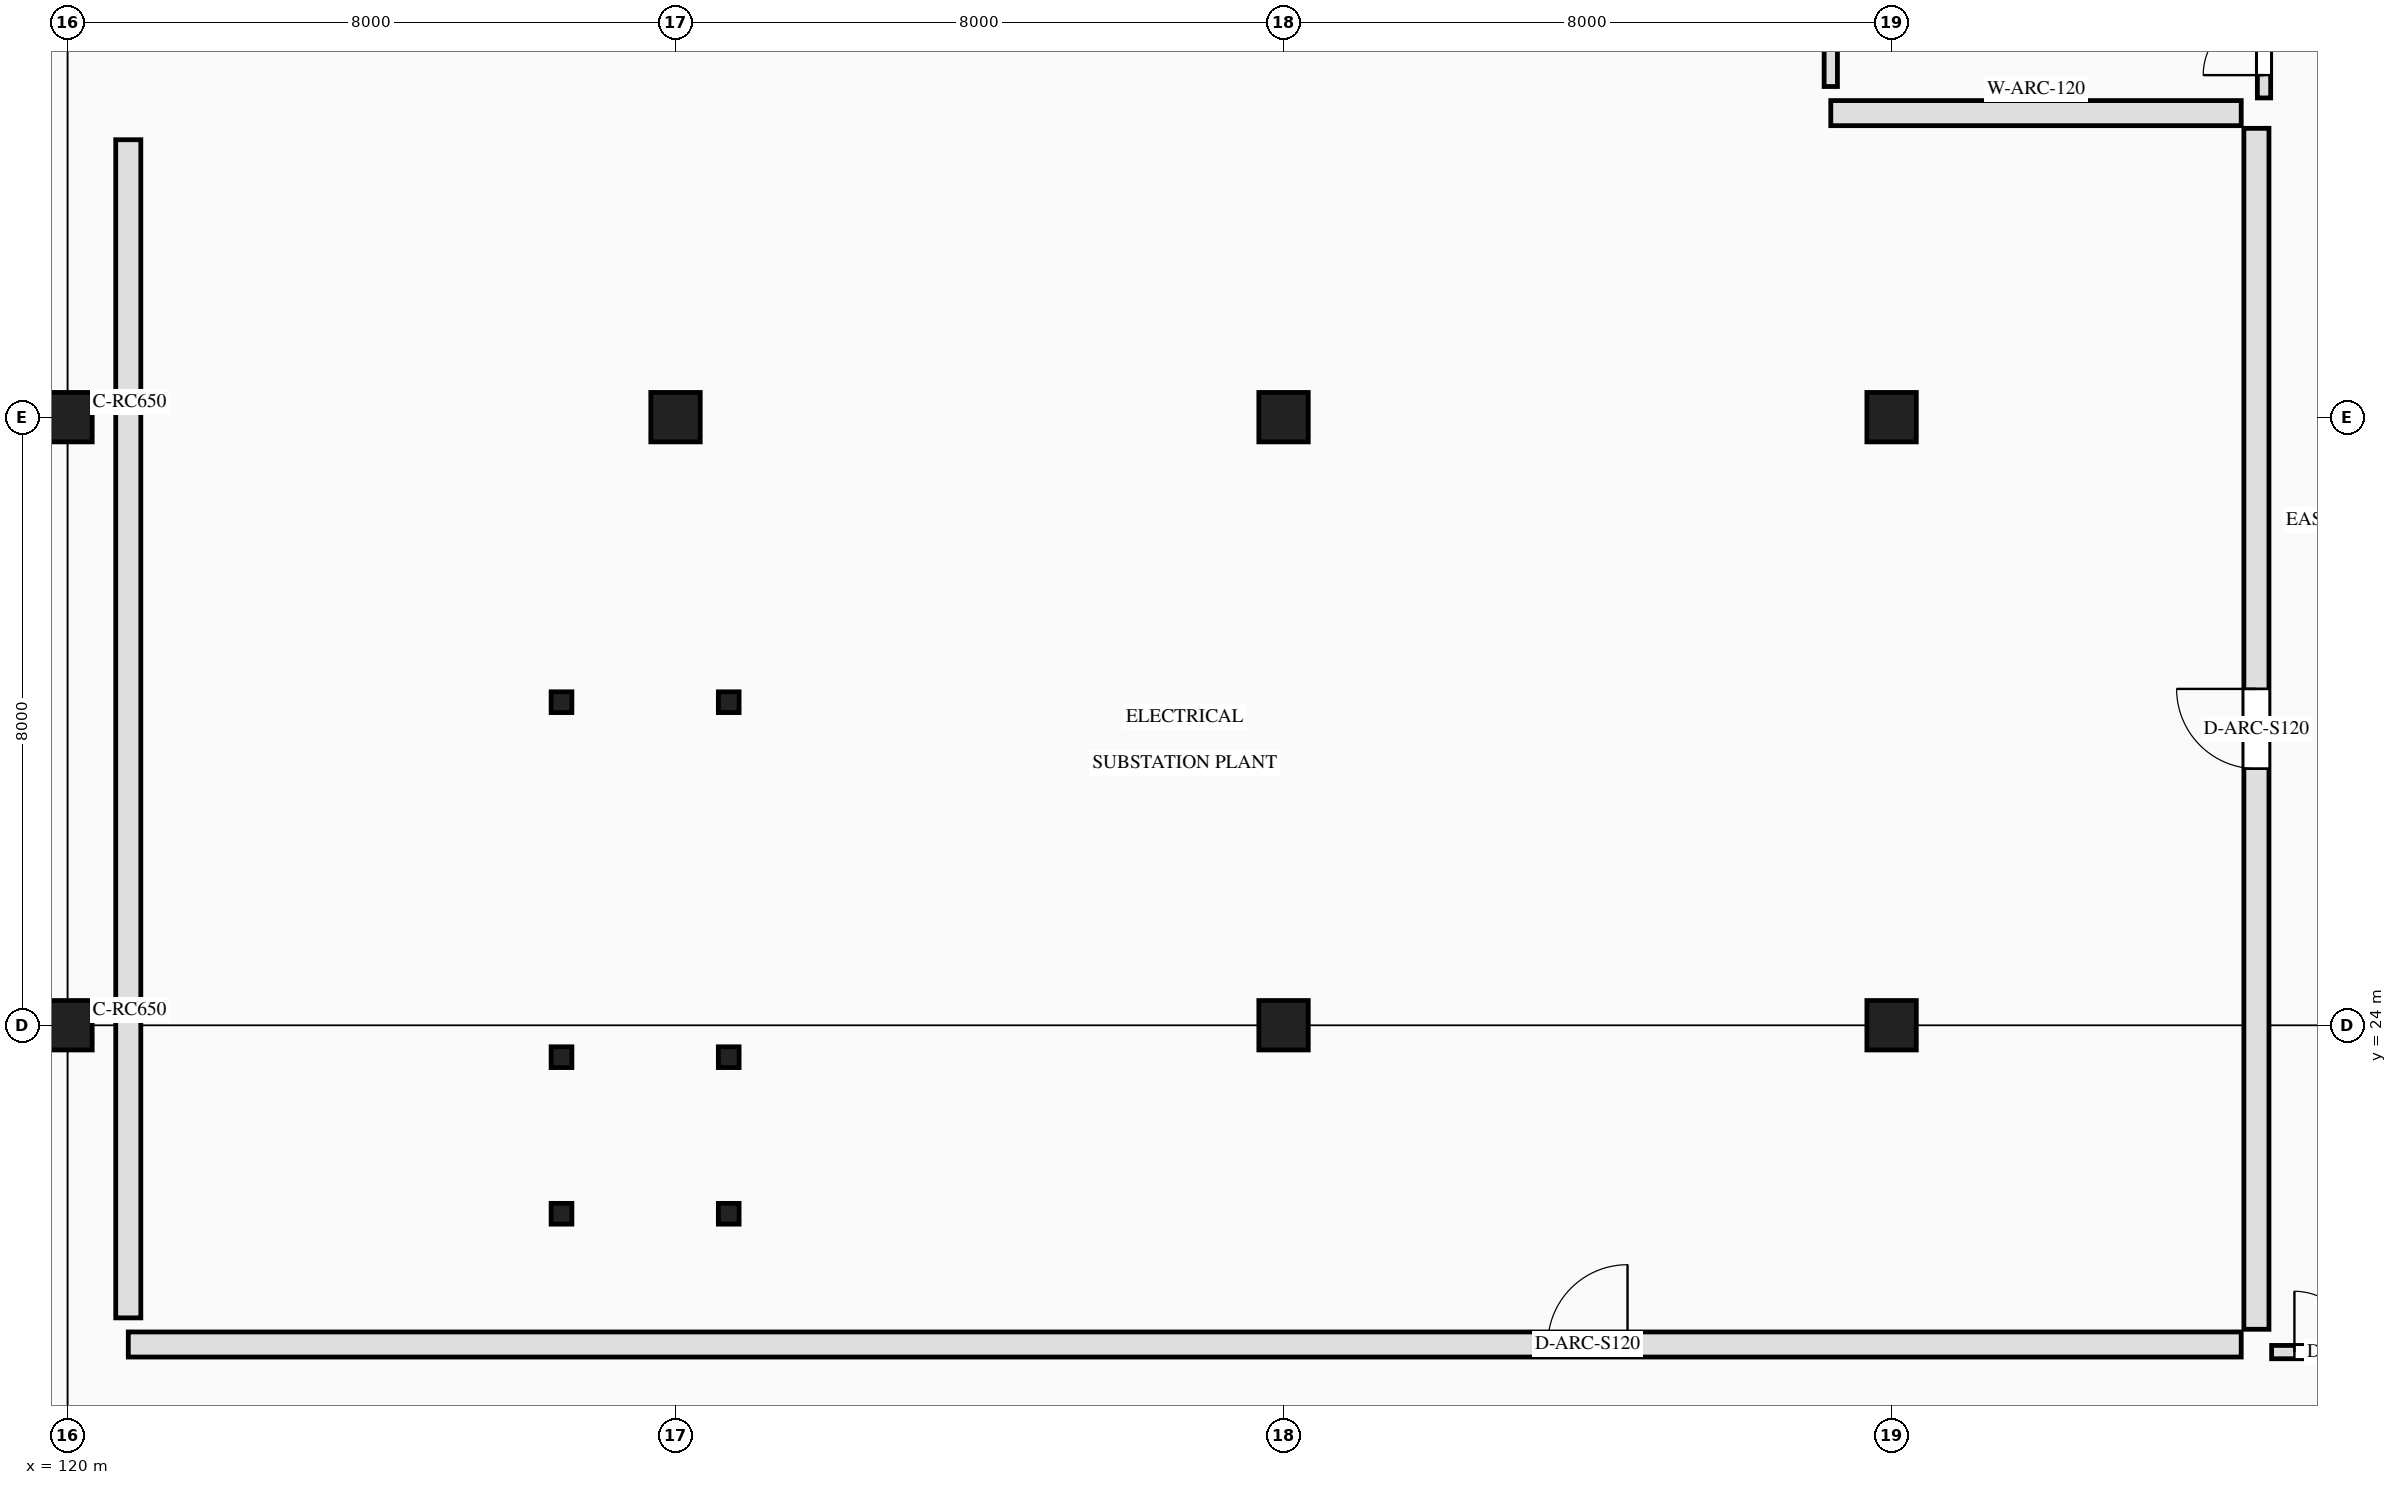
"""IFC4 building model, lengths in metres.
Left out: names, types, materials, properties, quantities, classifications, styles, units other than length and angle.
Written with IfcOpenShell. Run it as: python <this file> out.ifc"""

import sys

from ifc_helpers import new_model, si_unit, direction, frame, frame_2d, origin, origin_2d, place, context, subcontext, project, spatial, rectangle, hollow_circle, extrude, element, fill, save


model = new_model("IFC4")
c1 = context("Model", 3, precision=1e-05, world=origin(), true_north=direction((0.0, 1.0)))
c2 = subcontext(c1, "Body", "Model", "MODEL_VIEW")
j1 = project(units=[si_unit("LENGTHUNIT", "METRE"), si_unit("PLANEANGLEUNIT", "RADIAN")], contexts=[c1])
p1 = place(None, origin())
s1 = spatial("IfcSite", under=j1, at=p1, CompositionType="ELEMENT")
p2 = place(p1, origin())
s2 = spatial("IfcBuilding", under=s1, at=p2, CompositionType="ELEMENT")
p3 = place(p2, frame((0.0, 0.0, -5.4)))
s3 = spatial("IfcBuildingStorey", under=s2, at=p3, CompositionType="ELEMENT", Elevation=-5.4)
for number, where, z_axis, x_axis in (
    (1, (120.0, 24.0, -0.4), (0.0, 0.0, 1.0), (1.0, 0.0, 0.0)),
    (2, (120.0, 32.0, -0.4), (0.0, 0.0, 1.0), (1.0, 0.0, 0.0)),
    (3, (128.0, 32.0, -0.4), (0.0, 0.0, 1.0), (1.0, 0.0, 0.0)),
    (4, (136.0, 24.0, -0.4), (0.0, 0.0, 1.0), (1.0, 0.0, 0.0)),
    (5, (136.0, 32.0, -0.4), (0.0, 0.0, 1.0), (1.0, 0.0, 0.0)),
    (6, (144.0, 24.0, -0.4), (0.0, 0.0, 1.0), (1.0, 0.0, 0.0)),
    (7, (144.0, 32.0, -0.4), (0.0, 0.0, 1.0), (1.0, 0.0, 0.0)),
):
    element("IfcColumn", number, at=place(p3, frame(where, z_axis=z_axis, x_axis=x_axis)), inside=s3, PredefinedType="COLUMN", context=c2, shape_type="SweptSolid", body=[
        extrude(rectangle(XDim=0.65, YDim=0.65, at=origin_2d()), origin(), (0.0, 0.0, 1.0), 5.8),
    ])
for number, where, z_axis, x_axis in (
    (8, (128.7, 21.52, 0.0), (0.0, 0.0, 1.0), (1.0, 0.0, 0.0)),
    (9, (126.5, 21.52, 0.0), (0.0, 0.0, 1.0), (1.0, 0.0, 0.0)),
    (10, (128.7, 23.58, 0.0), (0.0, 0.0, 1.0), (1.0, 0.0, 0.0)),
    (11, (126.5, 23.58, 0.0), (0.0, 0.0, 1.0), (1.0, 0.0, 0.0)),
    (12, (128.7, 28.25, 0.0), (0.0, 0.0, 1.0), (1.0, 0.0, 0.0)),
    (13, (126.5, 28.25, 0.0), (0.0, 0.0, 1.0), (1.0, 0.0, 0.0)),
):
    element("IfcColumn", number, at=place(p3, frame(where, z_axis=z_axis, x_axis=x_axis)), inside=s3, PredefinedType="COLUMN", context=c2, shape_type="SweptSolid", body=[
        extrude(hollow_circle(Radius=0.136, WallThickness=0.012, at=origin_2d()), origin(), (0.0, 0.0, 1.0), 5.4),
    ])
p4 = place(p3, frame((148.9, 36.2, 0.0), z_axis=(0.0, 0.0, 1.0), x_axis=(0.0, 1.0, 0.0)))
e14 = element("IfcWall", 14, at=p4, inside=s3, PredefinedType="PARTITIONING", context=c2, shape_type="SweptSolid", body=[
    extrude(rectangle(XDim=4.6, YDim=0.175, at=frame_2d((2.3, 0.0))), origin(), (0.0, 0.0, 1.0), 5.12),
])
p5 = place(p4, frame((0.3, 0.0, 0.0)))
e15 = element("IfcOpeningElement", 15, at=p5, cuts=e14, PredefinedType="OPENING", context=c2, shape_type="SweptSolid", body=[
    extrude(rectangle(XDim=1.6, YDim=2.25, at=frame_2d((0.8, 1.125))), frame((0.0, 0.097, 0.0), z_axis=(0.0, -1.0, 0.0), x_axis=(1.0, 0.0, 0.0)), (0.0, 0.0, 1.0), 0.195),
])
p6 = place(p3, frame((143.2, 36.0, 0.0), z_axis=(0.0, 0.0, 1.0), x_axis=(1.0, 0.0, 0.0)))
e16 = element("IfcWall", 16, at=p6, inside=s3, PredefinedType="SOLIDWALL", context=c2, shape_type="SweptSolid", body=[
    extrude(rectangle(XDim=5.4, YDim=0.33, at=frame_2d((2.7, 0.0))), origin(), (0.0, 0.0, 1.0), 5.12),
])
p7 = place(p3, frame((149.0, 19.7, 0.0), z_axis=(0.0, 0.0, 1.0), x_axis=(1.0, 0.0, 0.0)))
e17 = element("IfcWall", 17, at=p7, inside=s3, PredefinedType="PARTITIONING", context=c2, shape_type="SweptSolid", body=[
    extrude(rectangle(XDim=3.2, YDim=0.175, at=frame_2d((1.6, 0.0))), origin(), (0.0, 0.0, 1.0), 5.12),
])
p8 = place(p7, frame((0.3, 0.0, 0.0)))
e18 = element("IfcOpeningElement", 18, at=p8, cuts=e17, PredefinedType="OPENING", context=c2, shape_type="SweptSolid", body=[
    extrude(rectangle(XDim=1.6, YDim=2.25, at=frame_2d((0.8, 1.125))), frame((0.0, 0.097, 0.0), z_axis=(0.0, -1.0, 0.0), x_axis=(1.0, 0.0, 0.0)), (0.0, 0.0, 1.0), 0.195),
])
p9 = place(p3, frame((148.8, 20.0, 0.0), z_axis=(0.0, 0.0, 1.0), x_axis=(0.0, 1.0, 0.0)))
e19 = element("IfcWall", 19, at=p9, inside=s3, PredefinedType="SOLIDWALL", context=c2, shape_type="SweptSolid", body=[
    extrude(rectangle(XDim=15.8, YDim=0.33, at=frame_2d((7.9, 0.0))), origin(), (0.0, 0.0, 1.0), 5.12),
])
p10 = place(p9, frame((7.375, 0.0, 0.0)))
e20 = element("IfcOpeningElement", 20, at=p10, cuts=e19, PredefinedType="OPENING", context=c2, shape_type="SweptSolid", body=[
    extrude(rectangle(XDim=1.05, YDim=2.15, at=frame_2d((0.525, 1.075))), frame((0.0, 0.175, 0.0), z_axis=(0.0, -1.0, 0.0), x_axis=(1.0, 0.0, 0.0)), (0.0, 0.0, 1.0), 0.35),
])
p11 = place(p3, frame((120.8, 19.8, 0.0), z_axis=(0.0, 0.0, 1.0), x_axis=(1.0, 0.0, 0.0)))
e21 = element("IfcWall", 21, at=p11, inside=s3, PredefinedType="SOLIDWALL", context=c2, shape_type="SweptSolid", body=[
    extrude(rectangle(XDim=27.8, YDim=0.33, at=frame_2d((13.9, 0.0))), origin(), (0.0, 0.0, 1.0), 5.12),
])
p12 = place(p11, frame((18.676, 0.0, 0.0)))
e22 = element("IfcOpeningElement", 22, at=p12, cuts=e21, PredefinedType="OPENING", context=c2, shape_type="SweptSolid", body=[
    extrude(rectangle(XDim=1.05, YDim=2.15, at=frame_2d((0.525, 1.075))), frame((0.0, 0.175, 0.0), z_axis=(0.0, -1.0, 0.0), x_axis=(1.0, 0.0, 0.0)), (0.0, 0.0, 1.0), 0.35),
])
p13 = place(p3, frame((143.2, 36.35, 0.0), z_axis=(0.0, 0.0, 1.0), x_axis=(0.0, 1.0, 0.0)))
e23 = element("IfcWall", 23, at=p13, inside=s3, PredefinedType="PARTITIONING", context=c2, shape_type="SweptSolid", body=[
    extrude(rectangle(XDim=4.3, YDim=0.175, at=frame_2d((2.15, 0.0))), origin(), (0.0, 0.0, 1.0), 5.12),
])
p14 = place(p3, frame((120.8, 20.15, 0.0), z_axis=(0.0, 0.0, 1.0), x_axis=(0.0, 1.0, 0.0)))
e24 = element("IfcWall", 24, at=p14, inside=s3, PredefinedType="SOLIDWALL", context=c2, shape_type="SweptSolid", body=[
    extrude(rectangle(XDim=15.5, YDim=0.33, at=frame_2d((7.75, 0.0))), origin(), (0.0, 0.0, 1.0), 5.12),
])
p15 = place(p5, origin())
e25 = element("IfcDoor", 25, at=p15, inside=s3, OperationType="DOUBLE_DOOR_SINGLE_SWING", PredefinedType="DOOR", context=c2, shape_type="SweptSolid", body=[
    extrude(rectangle(XDim=1.6, YDim=2.25, at=frame_2d((0.8, 1.125))), frame((0.0, 0.025, 0.0), z_axis=(0.0, -1.0, 0.0), x_axis=(1.0, 0.0, 0.0)), (0.0, 0.0, 1.0), 0.05),
])
fill(e15, e25)
p16 = place(p8, origin())
e26 = element("IfcDoor", 26, at=p16, inside=s3, OperationType="DOUBLE_DOOR_SINGLE_SWING", PredefinedType="DOOR", context=c2, shape_type="SweptSolid", body=[
    extrude(rectangle(XDim=1.6, YDim=2.25, at=frame_2d((0.8, 1.125))), frame((0.0, 0.025, 0.0), z_axis=(0.0, -1.0, 0.0), x_axis=(1.0, 0.0, 0.0)), (0.0, 0.0, 1.0), 0.05),
])
fill(e18, e26)
p17 = place(p10, origin())
e27 = element("IfcDoor", 27, at=p17, inside=s3, OperationType="SINGLE_SWING_RIGHT", PredefinedType="DOOR", context=c2, shape_type="SweptSolid", body=[
    extrude(rectangle(XDim=1.05, YDim=2.15, at=frame_2d((0.525, 1.075))), frame((0.0, 0.025, 0.0), z_axis=(0.0, -1.0, 0.0), x_axis=(1.0, 0.0, 0.0)), (0.0, 0.0, 1.0), 0.05),
])
fill(e20, e27)
p18 = place(p12, origin())
e28 = element("IfcDoor", 28, at=p18, inside=s3, OperationType="SINGLE_SWING_RIGHT", PredefinedType="DOOR", context=c2, shape_type="SweptSolid", body=[
    extrude(rectangle(XDim=1.05, YDim=2.15, at=frame_2d((0.525, 1.075))), frame((0.0, 0.025, 0.0), z_axis=(0.0, -1.0, 0.0), x_axis=(1.0, 0.0, 0.0)), (0.0, 0.0, 1.0), 0.05),
])
fill(e22, e28)
save(model, sys.argv[1])
